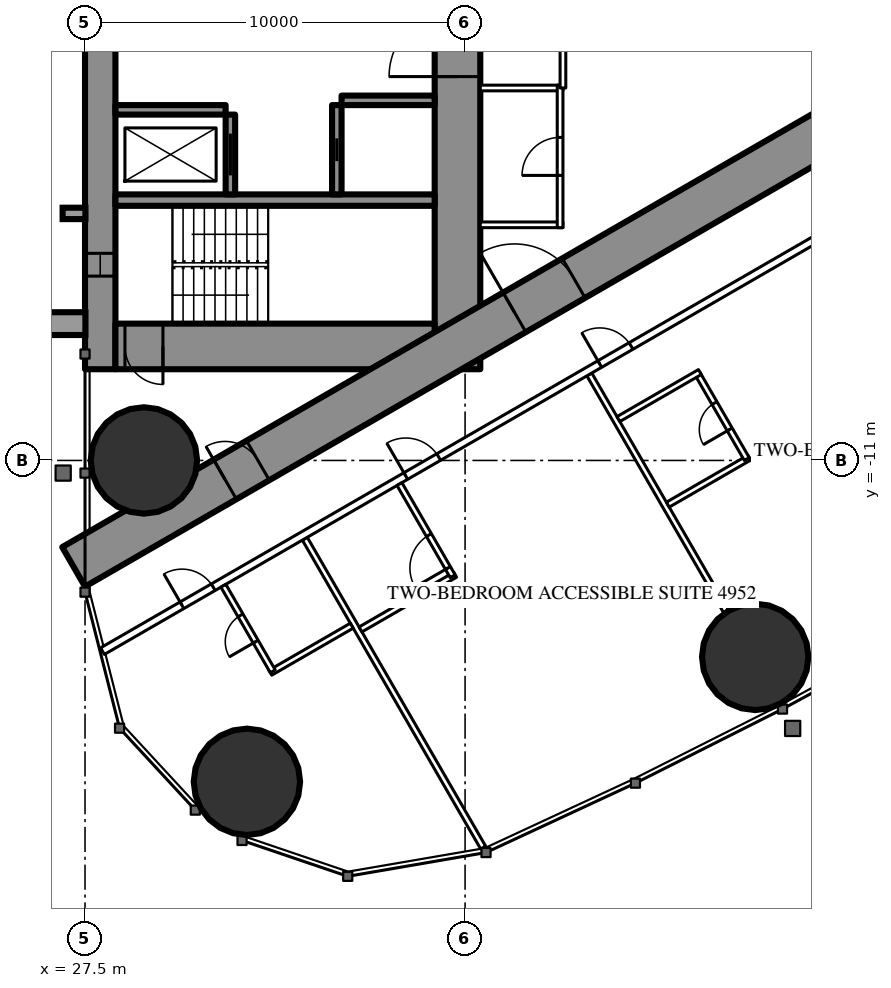
"""IFC4 building model, lengths in metres.
Left out: names, types, materials, properties, quantities, classifications, styles, units other than length and angle.
Written with IfcOpenShell. Run it as: python <this file> out.ifc"""

import sys

from ifc_helpers import new_model, si_unit, direction, frame, frame_2d, origin, origin_2d, place, context, subcontext, project, spatial, rectangle, circle, extrude, element, fill, save


model = new_model("IFC4")
c1 = context("Model", 3, precision=1e-05, world=origin(), true_north=direction((0.0, 1.0)))
c2 = subcontext(c1, "Body", "Model", "MODEL_VIEW")
j1 = project(units=[si_unit("LENGTHUNIT", "METRE"), si_unit("PLANEANGLEUNIT", "RADIAN")], contexts=[c1])
p1 = place(None, origin())
s1 = spatial("IfcSite", under=j1, at=p1, CompositionType="ELEMENT")
p2 = place(p1, origin())
s2 = spatial("IfcBuilding", under=s1, at=p2, CompositionType="ELEMENT")
p3 = place(p2, frame((0.0, 0.0, 184.3)))
s3 = spatial("IfcBuildingStorey", under=s2, at=p3, CompositionType="ELEMENT", Elevation=184.3)
for number, where, z_axis, x_axis in (
    (1, (31.76, -19.456, 0.0), (0.0, 0.0, 1.0), (1.0, 0.0, 0.0)),
    (2, (29.05, -11.0, 0.0), (0.0, 0.0, 1.0), (1.0, 0.0, 0.0)),
    (3, (45.134, -16.168, 0.0), (0.0, 0.0, 1.0), (1.0, 0.0, 0.0)),
):
    element("IfcColumn", number, at=place(p3, frame(where, z_axis=z_axis, x_axis=x_axis)), inside=s3, PredefinedType="COLUMN", context=c2, shape_type="SweptSolid", body=[
        extrude(circle(Radius=1.4, at=origin_2d()), origin(), (0.0, 0.0, 1.0), 3.5),
    ])
p4 = place(p3, frame((27.9, -8.6, 0.0), z_axis=(0.0, 0.0, 1.0), x_axis=(0.0, 1.0, 0.0)))
e4 = element("IfcWall", 4, at=p4, inside=s3, PredefinedType="SHEAR", context=c2, shape_type="SweptSolid", body=[
    extrude(rectangle(XDim=17.2, YDim=0.8, at=frame_2d((8.6, 0.0))), origin(), (0.0, 0.0, 1.0), 3.5),
])
p5 = place(p4, frame((2.45, 0.0, 0.6)))
e5 = element("IfcOpeningElement", 5, at=p5, cuts=e4, PredefinedType="OPENING", context=c2, shape_type="SweptSolid", body=[
    extrude(rectangle(XDim=0.6, YDim=2.1, at=frame_2d((0.3, 1.05))), frame((0.0, 0.41, 0.0), z_axis=(0.0, -1.0, 0.0), x_axis=(1.0, 0.0, 0.0)), (0.0, 0.0, 1.0), 0.82),
])
p6 = place(p4, frame((14.15, 0.0, 0.6)))
e6 = element("IfcOpeningElement", 6, at=p6, cuts=e4, PredefinedType="OPENING", context=c2, shape_type="SweptSolid", body=[
    extrude(rectangle(XDim=0.6, YDim=2.1, at=frame_2d((0.3, 1.05))), frame((0.0, 0.41, 0.0), z_axis=(0.0, -1.0, 0.0), x_axis=(1.0, 0.0, 0.0)), (0.0, 0.0, 1.0), 0.82),
])
p7 = place(p3, frame((37.3, -8.6, 0.0), z_axis=(0.0, 0.0, 1.0), x_axis=(0.0, 1.0, 0.0)))
e7 = element("IfcWall", 7, at=p7, inside=s3, PredefinedType="SHEAR", context=c2, shape_type="SweptSolid", body=[
    extrude(rectangle(XDim=17.2, YDim=1.2, at=frame_2d((8.6, 0.0))), origin(), (0.0, 0.0, 1.0), 3.5),
])
p8 = place(p7, frame((7.7, 0.0, 0.0)))
e8 = element("IfcOpeningElement", 8, at=p8, cuts=e7, PredefinedType="OPENING", context=c2, shape_type="SweptSolid", body=[
    extrude(rectangle(XDim=1.8, YDim=2.2, at=frame_2d((0.9, 1.1))), frame((0.0, 0.61, 0.0), z_axis=(0.0, -1.0, 0.0), x_axis=(1.0, 0.0, 0.0)), (0.0, 0.0, 1.0), 1.22),
])
p9 = place(p3, frame((28.3, -8.0, 0.0), z_axis=(0.0, 0.0, 1.0), x_axis=(1.0, 0.0, 0.0)))
e9 = element("IfcWall", 9, at=p9, inside=s3, PredefinedType="SHEAR", context=c2, shape_type="SweptSolid", body=[
    extrude(rectangle(XDim=8.4, YDim=1.2, at=frame_2d((4.2, 0.0))), origin(), (0.0, 0.0, 1.0), 3.5),
])
p10 = place(p9, frame((0.25, 0.0, 0.0)))
e10 = element("IfcOpeningElement", 10, at=p10, cuts=e9, PredefinedType="OPENING", context=c2, shape_type="SweptSolid", body=[
    extrude(rectangle(XDim=1.0, YDim=2.2, at=frame_2d((0.5, 1.1))), frame((0.0, 0.61, 0.0), z_axis=(0.0, -1.0, 0.0), x_axis=(1.0, 0.0, 0.0)), (0.0, 0.0, 1.0), 1.22),
])
p11 = place(p3, frame((28.3, -4.15, 0.0), z_axis=(0.0, 0.0, 1.0), x_axis=(1.0, 0.0, 0.0)))
e11 = element("IfcWall", 11, at=p11, inside=s3, PredefinedType="SHEAR", context=c2, shape_type="SweptSolid", body=[
    extrude(rectangle(XDim=8.4, YDim=0.3, at=frame_2d((4.2, 0.0))), origin(), (0.0, 0.0, 1.0), 3.5),
])
p12 = place(p3, frame((31.325, -4.0, 0.0), z_axis=(0.0, 0.0, 1.0), x_axis=(0.0, 1.0, 0.0)))
e12 = element("IfcWall", 12, at=p12, inside=s3, PredefinedType="SHEAR", context=c2, shape_type="SweptSolid", body=[
    extrude(rectangle(XDim=2.1, YDim=0.25, at=frame_2d((1.05, 0.0))), origin(), (0.0, 0.0, 1.0), 3.5),
])
p13 = place(p12, frame((0.5, 0.0, 0.0)))
e13 = element("IfcOpeningElement", 13, at=p13, cuts=e12, PredefinedType="OPENING", context=c2, shape_type="SweptSolid", body=[
    extrude(rectangle(XDim=1.1, YDim=2.2, at=frame_2d((0.55, 1.1))), frame((0.0, 0.135, 0.0), z_axis=(0.0, -1.0, 0.0), x_axis=(1.0, 0.0, 0.0)), (0.0, 0.0, 1.0), 0.27),
])
p14 = place(p3, frame((34.125, -4.0, 0.0), z_axis=(0.0, 0.0, 1.0), x_axis=(0.0, 1.0, 0.0)))
e14 = element("IfcWall", 14, at=p14, inside=s3, PredefinedType="SHEAR", context=c2, shape_type="SweptSolid", body=[
    extrude(rectangle(XDim=2.35, YDim=0.25, at=frame_2d((1.175, 0.0))), origin(), (0.0, 0.0, 1.0), 3.5),
])
p15 = place(p14, frame((0.875, 0.0, 0.0)))
e15 = element("IfcOpeningElement", 15, at=p15, cuts=e14, PredefinedType="OPENING", context=c2, shape_type="SweptSolid", body=[
    extrude(rectangle(XDim=0.6, YDim=2.0, at=frame_2d((0.3, 1.0))), frame((0.0, 0.135, 0.0), z_axis=(0.0, -1.0, 0.0), x_axis=(1.0, 0.0, 0.0)), (0.0, 0.0, 1.0), 0.27),
])
p16 = place(p3, frame((28.3, -1.775, 0.0), z_axis=(0.0, 0.0, 1.0), x_axis=(1.0, 0.0, 0.0)))
e16 = element("IfcWall", 16, at=p16, inside=s3, PredefinedType="SHEAR", context=c2, shape_type="SweptSolid", body=[
    extrude(rectangle(XDim=2.9, YDim=0.25, at=frame_2d((1.45, 0.0))), origin(), (0.0, 0.0, 1.0), 3.5),
])
p17 = place(p3, frame((34.25, -1.525, 0.0), z_axis=(0.0, 0.0, 1.0), x_axis=(1.0, 0.0, 0.0)))
e17 = element("IfcWall", 17, at=p17, inside=s3, PredefinedType="SHEAR", context=c2, shape_type="SweptSolid", body=[
    extrude(rectangle(XDim=2.45, YDim=0.25, at=frame_2d((1.225, 0.0))), origin(), (0.0, 0.0, 1.0), 3.5),
])
p18 = place(p3, frame((27.2, -13.8, 0.0), z_axis=(0.0, 0.0, 1.0), x_axis=(0.866027159892, 0.499996958321, 0.0)))
e18 = element("IfcWall", 18, at=p18, inside=s3, PredefinedType="SHEAR", context=c2, shape_type="SweptSolid", body=[
    extrude(rectangle(XDim=27.947, YDim=1.2, at=frame_2d((13.973, 0.0))), origin(), (0.0, 0.0, 1.0), 3.5),
])
p19 = place(p18, frame((4.6, 0.0, 0.0)))
e19 = element("IfcOpeningElement", 19, at=p19, cuts=e18, PredefinedType="OPENING", context=c2, shape_type="SweptSolid", body=[
    extrude(rectangle(XDim=1.0, YDim=2.2, at=frame_2d((0.5, 1.1))), frame((0.0, 0.61, 0.0), z_axis=(0.0, -1.0, 0.0), x_axis=(1.0, 0.0, 0.0)), (0.0, 0.0, 1.0), 1.22),
])
p20 = place(p18, frame((13.395, 0.0, 0.0)))
e20 = element("IfcOpeningElement", 20, at=p20, cuts=e18, PredefinedType="OPENING", context=c2, shape_type="SweptSolid", body=[
    extrude(rectangle(XDim=1.8, YDim=2.2, at=frame_2d((0.9, 1.1))), frame((0.0, 0.61, 0.0), z_axis=(0.0, -1.0, 0.0), x_axis=(1.0, 0.0, 0.0)), (0.0, 0.0, 1.0), 1.22),
])
p21 = place(p3, frame((33.284, -13.059, 0.0), z_axis=(0.0, 0.0, 1.0), x_axis=(0.499985904184, -0.866033541855, 0.0)))
e21 = element("IfcWall", 21, at=p21, inside=s3, PredefinedType="PARTITIONING", context=c2, shape_type="SweptSolid", body=[
    extrude(rectangle(XDim=9.385, YDim=0.15, at=frame_2d((4.693, 0.0))), origin(), (0.0, 0.0, 1.0), 3.25),
])
p22 = place(p3, frame((40.769, -8.737, 0.0), z_axis=(0.0, 0.0, 1.0), x_axis=(0.500013115284, -0.866017831539, 0.0)))
e22 = element("IfcWall", 22, at=p22, inside=s3, PredefinedType="PARTITIONING", context=c2, shape_type="SweptSolid", body=[
    extrude(rectangle(XDim=7.198, YDim=0.15, at=frame_2d((3.599, 0.0))), origin(), (0.0, 0.0, 1.0), 2.3),
])
p23 = place(p3, frame((27.959, -16.017, 0.0), z_axis=(0.0, 0.0, 1.0), x_axis=(0.866024180982, 0.50000211795, 0.0)))
e23 = element("IfcWall", 23, at=p23, inside=s3, PredefinedType="PARTITIONING", context=c2, shape_type="SweptSolid", body=[
    extrude(rectangle(XDim=23.375, YDim=0.2, at=frame_2d((11.688, 0.0))), origin(), (0.0, 0.0, 1.0), 3.25),
])
p24 = place(p23, frame((2.415, 0.0, 0.0)))
e24 = element("IfcOpeningElement", 24, at=p24, cuts=e23, PredefinedType="OPENING", context=c2, shape_type="SweptSolid", body=[
    extrude(rectangle(XDim=0.95, YDim=2.2, at=frame_2d((0.475, 1.1))), frame((0.0, 0.11, 0.0), z_axis=(0.0, -1.0, 0.0), x_axis=(1.0, 0.0, 0.0)), (0.0, 0.0, 1.0), 0.22),
])
p25 = place(p23, frame((9.215, 0.0, 0.0)))
e25 = element("IfcOpeningElement", 25, at=p25, cuts=e23, PredefinedType="OPENING", context=c2, shape_type="SweptSolid", body=[
    extrude(rectangle(XDim=1.0, YDim=2.2, at=frame_2d((0.5, 1.1))), frame((0.0, 0.11, 0.0), z_axis=(0.0, -1.0, 0.0), x_axis=(1.0, 0.0, 0.0)), (0.0, 0.0, 1.0), 0.22),
])
p26 = place(p23, frame((15.109, 0.0, 0.0)))
e26 = element("IfcOpeningElement", 26, at=p26, cuts=e23, PredefinedType="OPENING", context=c2, shape_type="SweptSolid", body=[
    extrude(rectangle(XDim=0.95, YDim=2.2, at=frame_2d((0.475, 1.1))), frame((0.0, 0.11, 0.0), z_axis=(0.0, -1.0, 0.0), x_axis=(1.0, 0.0, 0.0)), (0.0, 0.0, 1.0), 0.22),
])
p27 = place(p3, frame((32.375, -16.585, 0.0), z_axis=(0.0, 0.0, 1.0), x_axis=(0.86604923931, 0.499958713387, 0.0)))
e27 = element("IfcWall", 27, at=p27, inside=s3, PredefinedType="PARTITIONING", context=c2, shape_type="SweptSolid", body=[
    extrude(rectangle(XDim=2.475, YDim=0.15, at=frame_2d((1.237, 0.0))), origin(), (0.0, 0.0, 1.0), 3.25),
])
p28 = place(p3, frame((31.14, -14.296, 0.0), z_axis=(0.0, 0.0, 1.0), x_axis=(0.500006934395, -0.866021400173, 0.0)))
e28 = element("IfcWall", 28, at=p28, inside=s3, PredefinedType="PARTITIONING", context=c2, shape_type="SweptSolid", body=[
    extrude(rectangle(XDim=2.6, YDim=0.15, at=frame_2d((1.3, 0.0))), origin(), (0.0, 0.0, 1.0), 3.25),
])
p29 = place(p28, frame((0.9, 0.0, 0.0)))
e29 = element("IfcOpeningElement", 29, at=p29, cuts=e28, PredefinedType="OPENING", context=c2, shape_type="SweptSolid", body=[
    extrude(rectangle(XDim=0.8, YDim=2.2, at=frame_2d((0.4, 1.1))), frame((0.0, 0.085, 0.0), z_axis=(0.0, -1.0, 0.0), x_axis=(1.0, 0.0, 0.0)), (0.0, 0.0, 1.0), 0.17),
])
p30 = place(p3, frame((34.749, -15.446, 0.0), z_axis=(0.0, 0.0, 1.0), x_axis=(0.866018712932, 0.500011588718, 0.0)))
e30 = element("IfcWall", 30, at=p30, inside=s3, PredefinedType="PARTITIONING", context=c2, shape_type="SweptSolid", body=[
    extrude(rectangle(XDim=2.875, YDim=0.15, at=frame_2d((1.438, 0.0))), origin(), (0.0, 0.0, 1.0), 3.25),
])
p31 = place(p3, frame((35.773, -11.621, 0.0), z_axis=(0.0, 0.0, 1.0), x_axis=(0.49998411664, -0.866034573852, 0.0)))
e31 = element("IfcWall", 31, at=p31, inside=s3, PredefinedType="PARTITIONING", context=c2, shape_type="SweptSolid", body=[
    extrude(rectangle(XDim=2.8, YDim=0.15, at=frame_2d((1.4, 0.0))), origin(), (0.0, 0.0, 1.0), 3.25),
])
p32 = place(p31, frame((1.55, 0.0, 0.0)))
e32 = element("IfcOpeningElement", 32, at=p32, cuts=e31, PredefinedType="OPENING", context=c2, shape_type="SweptSolid", body=[
    extrude(rectangle(XDim=1.0, YDim=2.2, at=frame_2d((0.5, 1.1))), frame((0.0, 0.085, 0.0), z_axis=(0.0, -1.0, 0.0), x_axis=(1.0, 0.0, 0.0)), (0.0, 0.0, 1.0), 0.17),
])
p33 = place(p3, frame((42.834, -12.164, 0.0), z_axis=(0.0, 0.0, 1.0), x_axis=(0.866031185235, 0.4999899861, 0.0)))
e33 = element("IfcWall", 33, at=p33, inside=s3, PredefinedType="PARTITIONING", context=c2, shape_type="SweptSolid", body=[
    extrude(rectangle(XDim=2.475, YDim=0.15, at=frame_2d((1.238, 0.0))), origin(), (0.0, 0.0, 1.0), 3.25),
])
p34 = place(p3, frame((43.613, -8.712, 0.0), z_axis=(0.0, 0.0, 1.0), x_axis=(0.500006934395, -0.866021400173, 0.0)))
e34 = element("IfcWall", 34, at=p34, inside=s3, PredefinedType="PARTITIONING", context=c2, shape_type="SweptSolid", body=[
    extrude(rectangle(XDim=2.6, YDim=0.15, at=frame_2d((1.3, 0.0))), origin(), (0.0, 0.0, 1.0), 3.25),
])
p35 = place(p34, frame((0.9, 0.0, 0.0)))
e35 = element("IfcOpeningElement", 35, at=p35, cuts=e34, PredefinedType="OPENING", context=c2, shape_type="SweptSolid", body=[
    extrude(rectangle(XDim=0.8, YDim=2.2, at=frame_2d((0.4, 1.1))), frame((0.0, 0.085, 0.0), z_axis=(0.0, -1.0, 0.0), x_axis=(1.0, 0.0, 0.0)), (0.0, 0.0, 1.0), 0.17),
])
p36 = place(p3, frame((41.534, -9.912, 0.0), z_axis=(0.0, 0.0, 1.0), x_axis=(0.866031185235, 0.4999899861, 0.0)))
e36 = element("IfcWall", 36, at=p36, inside=s3, PredefinedType="PARTITIONING", context=c2, shape_type="SweptSolid", body=[
    extrude(rectangle(XDim=2.475, YDim=0.15, at=frame_2d((1.238, 0.0))), origin(), (0.0, 0.0, 1.0), 3.25),
])
for number, where, z_axis, x_axis in (
    (37, (37.9, -1.2, 0.0), (0.0, 0.0, 1.0), (1.0, 0.0, 0.0)),
    (38, (37.9, -4.8, 0.0), (0.0, 0.0, 1.0), (1.0, 0.0, 0.0)),
):
    element("IfcWall", number, at=place(p3, frame(where, z_axis=z_axis, x_axis=x_axis)), inside=s3, PredefinedType="PARTITIONING", context=c2, shape_type="SweptSolid", body=[
        extrude(rectangle(XDim=2.175, YDim=0.15, at=frame_2d((1.087, 0.0))), origin(), (0.0, 0.0, 1.0), 3.25),
    ])
p37 = place(p3, frame((40.0, -4.875, 0.0), z_axis=(0.0, 0.0, 1.0), x_axis=(0.0, 1.0, 0.0)))
e39 = element("IfcWall", 39, at=p37, inside=s3, PredefinedType="PARTITIONING", context=c2, shape_type="SweptSolid", body=[
    extrude(rectangle(XDim=3.75, YDim=0.15, at=frame_2d((1.875, 0.0))), origin(), (0.0, 0.0, 1.0), 3.25),
])
p38 = place(p37, frame((1.375, 0.0, 0.0)))
e40 = element("IfcOpeningElement", 40, at=p38, cuts=e39, PredefinedType="OPENING", context=c2, shape_type="SweptSolid", body=[
    extrude(rectangle(XDim=1.0, YDim=2.2, at=frame_2d((0.5, 1.1))), frame((0.0, 0.085, 0.0), z_axis=(0.0, -1.0, 0.0), x_axis=(1.0, 0.0, 0.0)), (0.0, 0.0, 1.0), 0.17),
])
p39 = place(p3, frame((40.075, -1.2, 0.0), z_axis=(0.0, 0.0, 1.0), x_axis=(0.0, 1.0, 0.0)))
e41 = element("IfcWall", 41, at=p39, inside=s3, PredefinedType="PARTITIONING", context=c2, shape_type="SweptSolid", body=[
    extrude(rectangle(XDim=6.874, YDim=0.15, at=frame_2d((3.437, 0.0))), origin(), (0.0, 0.0, 1.0), 3.25),
])
p40 = place(p39, frame((2.537, 0.0, 0.0)))
e42 = element("IfcOpeningElement", 42, at=p40, cuts=e41, PredefinedType="OPENING", context=c2, shape_type="SweptSolid", body=[
    extrude(rectangle(XDim=1.8, YDim=2.2, at=frame_2d((0.9, 1.1))), frame((0.0, 0.085, 0.0), z_axis=(0.0, -1.0, 0.0), x_axis=(1.0, 0.0, 0.0)), (0.0, 0.0, 1.0), 0.17),
])
p41 = place(p29, origin())
e43 = element("IfcDoor", 43, at=p41, inside=s3, OperationType="SINGLE_SWING_RIGHT", PredefinedType="DOOR", context=c2, shape_type="SweptSolid", body=[
    extrude(rectangle(XDim=0.8, YDim=2.2, at=frame_2d((0.4, 1.1))), frame((0.0, 0.025, 0.0), z_axis=(0.0, -1.0, 0.0), x_axis=(1.0, 0.0, 0.0)), (0.0, 0.0, 1.0), 0.05),
])
fill(e29, e43)
p42 = place(p24, origin())
e44 = element("IfcDoor", 44, at=p42, inside=s3, OperationType="SINGLE_SWING_LEFT", PredefinedType="DOOR", context=c2, shape_type="SweptSolid", body=[
    extrude(rectangle(XDim=0.95, YDim=2.2, at=frame_2d((0.475, 1.1))), frame((0.0, 0.025, 0.0), z_axis=(0.0, -1.0, 0.0), x_axis=(1.0, 0.0, 0.0)), (0.0, 0.0, 1.0), 0.05),
])
fill(e24, e44)
p43 = place(p32, origin())
e45 = element("IfcDoor", 45, at=p43, inside=s3, OperationType="SINGLE_SWING_RIGHT", PredefinedType="DOOR", context=c2, shape_type="SweptSolid", body=[
    extrude(rectangle(XDim=1.0, YDim=2.2, at=frame_2d((0.5, 1.1))), frame((0.0, 0.025, 0.0), z_axis=(0.0, -1.0, 0.0), x_axis=(1.0, 0.0, 0.0)), (0.0, 0.0, 1.0), 0.05),
])
fill(e32, e45)
p44 = place(p25, origin())
e46 = element("IfcDoor", 46, at=p44, inside=s3, OperationType="SINGLE_SWING_LEFT", PredefinedType="DOOR", context=c2, shape_type="SweptSolid", body=[
    extrude(rectangle(XDim=1.0, YDim=2.2, at=frame_2d((0.5, 1.1))), frame((0.0, 0.025, 0.0), z_axis=(0.0, -1.0, 0.0), x_axis=(1.0, 0.0, 0.0)), (0.0, 0.0, 1.0), 0.05),
])
fill(e25, e46)
p45 = place(p35, origin())
e47 = element("IfcDoor", 47, at=p45, inside=s3, OperationType="SINGLE_SWING_RIGHT", PredefinedType="DOOR", context=c2, shape_type="SweptSolid", body=[
    extrude(rectangle(XDim=0.8, YDim=2.2, at=frame_2d((0.4, 1.1))), frame((0.0, 0.025, 0.0), z_axis=(0.0, -1.0, 0.0), x_axis=(1.0, 0.0, 0.0)), (0.0, 0.0, 1.0), 0.05),
])
fill(e35, e47)
p46 = place(p26, origin())
e48 = element("IfcDoor", 48, at=p46, inside=s3, OperationType="SINGLE_SWING_LEFT", PredefinedType="DOOR", context=c2, shape_type="SweptSolid", body=[
    extrude(rectangle(XDim=0.95, YDim=2.2, at=frame_2d((0.475, 1.1))), frame((0.0, 0.025, 0.0), z_axis=(0.0, -1.0, 0.0), x_axis=(1.0, 0.0, 0.0)), (0.0, 0.0, 1.0), 0.05),
])
fill(e26, e48)
p47 = place(p38, origin())
e49 = element("IfcDoor", 49, at=p47, inside=s3, OperationType="SINGLE_SWING_LEFT", PredefinedType="DOOR", context=c2, shape_type="SweptSolid", body=[
    extrude(rectangle(XDim=1.0, YDim=2.2, at=frame_2d((0.5, 1.1))), frame((0.0, 0.025, 0.0), z_axis=(0.0, -1.0, 0.0), x_axis=(1.0, 0.0, 0.0)), (0.0, 0.0, 1.0), 0.05),
])
fill(e40, e49)
p48 = place(p19, origin())
e50 = element("IfcDoor", 50, at=p48, inside=s3, OperationType="SINGLE_SWING_LEFT", PredefinedType="DOOR", context=c2, shape_type="SweptSolid", body=[
    extrude(rectangle(XDim=1.0, YDim=2.2, at=frame_2d((0.5, 1.1))), frame((0.0, 0.025, 0.0), z_axis=(0.0, -1.0, 0.0), x_axis=(1.0, 0.0, 0.0)), (0.0, 0.0, 1.0), 0.05),
])
fill(e19, e50)
p49 = place(p20, origin())
e51 = element("IfcDoor", 51, at=p49, inside=s3, OperationType="DOUBLE_DOOR_SINGLE_SWING", PredefinedType="DOOR", context=c2, shape_type="SweptSolid", body=[
    extrude(rectangle(XDim=1.8, YDim=2.2, at=frame_2d((0.9, 1.1))), frame((0.0, 0.025, 0.0), z_axis=(0.0, -1.0, 0.0), x_axis=(1.0, 0.0, 0.0)), (0.0, 0.0, 1.0), 0.05),
])
fill(e20, e51)
p50 = place(p8, origin())
e52 = element("IfcDoor", 52, at=p50, inside=s3, OperationType="DOUBLE_DOOR_SINGLE_SWING", PredefinedType="DOOR", context=c2, shape_type="SweptSolid", body=[
    extrude(rectangle(XDim=1.8, YDim=2.2, at=frame_2d((0.9, 1.1))), frame((0.0, 0.025, 0.0), z_axis=(0.0, -1.0, 0.0), x_axis=(1.0, 0.0, 0.0)), (0.0, 0.0, 1.0), 0.05),
])
fill(e8, e52)
p51 = place(p10, origin())
e53 = element("IfcDoor", 53, at=p51, inside=s3, OperationType="SINGLE_SWING_RIGHT", PredefinedType="DOOR", context=c2, shape_type="SweptSolid", body=[
    extrude(rectangle(XDim=1.0, YDim=2.2, at=frame_2d((0.5, 1.1))), frame((0.0, 0.025, 0.0), z_axis=(0.0, -1.0, 0.0), x_axis=(1.0, 0.0, 0.0)), (0.0, 0.0, 1.0), 0.05),
])
fill(e10, e53)
p52 = place(p13, origin())
e54 = element("IfcDoor", 54, at=p52, inside=s3, OperationType="SLIDING_TO_LEFT", PredefinedType="USERDEFINED", context=c2, shape_type="SweptSolid", body=[
    extrude(rectangle(XDim=1.1, YDim=2.2, at=frame_2d((0.55, 1.1))), frame((0.0, 0.025, 0.0), z_axis=(0.0, -1.0, 0.0), x_axis=(1.0, 0.0, 0.0)), (0.0, 0.0, 1.0), 0.05),
])
fill(e13, e54)
p53 = place(p15, origin())
e55 = element("IfcDoor", 55, at=p53, inside=s3, OperationType="SLIDING_TO_LEFT", PredefinedType="DOOR", context=c2, shape_type="SweptSolid", body=[
    extrude(rectangle(XDim=0.6, YDim=2.0, at=frame_2d((0.3, 1.0))), frame((0.0, 0.025, 0.0), z_axis=(0.0, -1.0, 0.0), x_axis=(1.0, 0.0, 0.0)), (0.0, 0.0, 1.0), 0.05),
])
fill(e15, e55)
p54 = place(p5, origin())
e56 = element("IfcWindow", 56, at=p54, inside=s3, PartitioningType="SINGLE_PANEL", PredefinedType="WINDOW", context=c2, shape_type="SweptSolid", body=[
    extrude(rectangle(XDim=0.6, YDim=2.1, at=frame_2d((0.3, 1.05))), frame((0.0, 0.03, 0.0), z_axis=(0.0, -1.0, 0.0), x_axis=(1.0, 0.0, 0.0)), (0.0, 0.0, 1.0), 0.06),
])
fill(e5, e56)
save(model, sys.argv[1])
